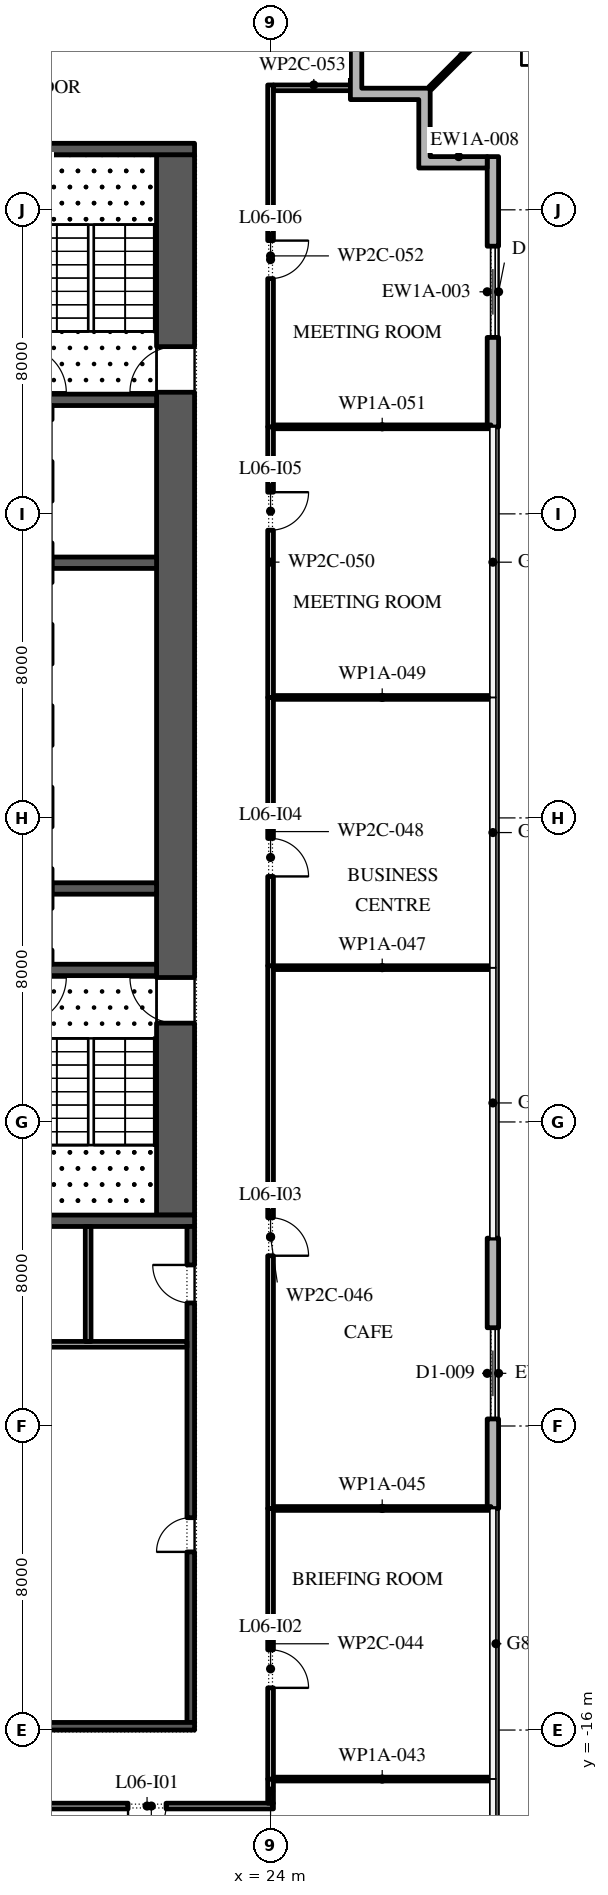
"""IFC4 building model, lengths in metres.
Left out: names, types, materials, properties, quantities, classifications, styles, units other than length and angle.
Written with IfcOpenShell. Run it as: python <this file> out.ifc"""

import sys

from ifc_helpers import new_model, si_unit, direction, frame, frame_2d, origin, place, context, subcontext, project, spatial, polyline, rectangle, outline, extrude, element, fill, save


model = new_model("IFC4")
c1 = context("Model", 3, precision=1e-05, world=origin(), true_north=direction((0.0, 1.0)))
c2 = subcontext(c1, "Body", "Model", "MODEL_VIEW")
j1 = project(units=[si_unit("LENGTHUNIT", "METRE"), si_unit("PLANEANGLEUNIT", "RADIAN")], contexts=[c1])
p1 = place(None, origin())
s1 = spatial("IfcSite", under=j1, at=p1, CompositionType="ELEMENT")
p2 = place(p1, origin())
s2 = spatial("IfcBuilding", under=s1, at=p2, CompositionType="ELEMENT")
p3 = place(p2, frame((0.0, 0.0, 33.6)))
s3 = spatial("IfcBuildingStorey", under=s2, at=p3, CompositionType="ELEMENT", Elevation=33.6)
p4 = place(p3, frame((29.85, -10.171, 0.0), z_axis=(0.0, 0.0, 1.0), x_axis=(0.0, 1.0, 0.0)))
e1 = element("IfcWall", 1, at=p4, inside=s3, PredefinedType="STANDARD", context=c2, shape_type="SweptSolid", body=[
    extrude(rectangle(XDim=7.114, YDim=0.3, at=frame_2d((3.557, 0.0))), origin(), (0.0, 0.0, 1.0), 5.8),
])
p5 = place(p4, frame((2.357, 0.0, 0.0)))
e2 = element("IfcOpeningElement", 2, at=p5, cuts=e1, PredefinedType="OPENING", context=c2, shape_type="SweptSolid", body=[
    extrude(rectangle(XDim=2.4, YDim=3.5, at=frame_2d((1.2, 1.75))), frame((0.0, 0.16, 0.0), z_axis=(0.0, -1.0, 0.0), x_axis=(1.0, 0.0, 0.0)), (0.0, 0.0, 1.0), 0.32),
])
p6 = place(p3, frame((29.85, 18.286, 0.0), z_axis=(0.0, 0.0, 1.0), x_axis=(0.0, 1.0, 0.0)))
e3 = element("IfcWall", 3, at=p6, inside=s3, PredefinedType="STANDARD", context=c2, shape_type="SweptSolid", body=[
    extrude(rectangle(XDim=7.114, YDim=0.3, at=frame_2d((3.557, 0.0))), origin(), (0.0, 0.0, 1.0), 5.8),
])
p7 = place(p6, frame((2.357, 0.0, 0.0)))
e4 = element("IfcOpeningElement", 4, at=p7, cuts=e3, PredefinedType="OPENING", context=c2, shape_type="SweptSolid", body=[
    extrude(rectangle(XDim=2.4, YDim=3.5, at=frame_2d((1.2, 1.75))), frame((0.0, 0.16, 0.0), z_axis=(0.0, -1.0, 0.0), x_axis=(1.0, 0.0, 0.0)), (0.0, 0.0, 1.0), 0.32),
])
p8 = place(p3, origin())
e5 = element("IfcWall", 5, at=p8, inside=s3, PredefinedType="STANDARD", context=c2, shape_type="SweptSolid", body=[
    extrude(outline(polyline([(27.9, 26.9), (26.1, 26.9), (26.1, 29.0), (26.4, 29.0), (26.4, 27.2), (28.2, 27.2), (28.2, 25.4), (29.7, 25.4), (29.7, 25.1), (27.9, 25.1), (27.9, 26.9)])), origin(), (0.0, 0.0, 1.0), 5.8),
])
p9 = place(p3, frame((28.2, 27.2, 0.0), z_axis=(0.0, 0.0, 1.0), x_axis=(0.707106781187, 0.707106781187, 0.0)))
e6 = element("IfcWall", 6, at=p9, inside=s3, PredefinedType="STANDARD", context=c2, shape_type="SweptSolid", body=[
    extrude(rectangle(XDim=2.385, YDim=0.1, at=frame_2d((1.192, 0.0))), origin(), (0.0, 0.0, 1.0), 5.8),
])
p10 = place(p3, frame((21.5, -2.45, 0.0), z_axis=(0.0, 0.0, 1.0), x_axis=(0.0, 1.0, 0.0)))
e7 = element("IfcWall", 7, at=p10, inside=s3, PredefinedType="SHEAR", context=c2, shape_type="SweptSolid", body=[
    extrude(rectangle(XDim=27.9, YDim=1.0, at=frame_2d((13.95, 0.0))), origin(), (0.0, 0.0, 1.0), 5.8),
])
p11 = place(p10, frame((5.05, 0.0, 0.0)))
e8 = element("IfcOpeningElement", 8, at=p11, cuts=e7, PredefinedType="OPENING", context=c2, shape_type="SweptSolid", body=[
    extrude(rectangle(XDim=1.2, YDim=2.1, at=frame_2d((0.6, 1.05))), frame((0.0, 0.51, 0.0), z_axis=(0.0, -1.0, 0.0), x_axis=(1.0, 0.0, 0.0)), (0.0, 0.0, 1.0), 1.02),
])
p12 = place(p10, frame((21.65, 0.0, 0.0)))
e9 = element("IfcOpeningElement", 9, at=p12, cuts=e7, PredefinedType="OPENING", context=c2, shape_type="SweptSolid", body=[
    extrude(rectangle(XDim=1.2, YDim=2.1, at=frame_2d((0.6, 1.05))), frame((0.0, 0.51, 0.0), z_axis=(0.0, -1.0, 0.0), x_axis=(1.0, 0.0, 0.0)), (0.0, 0.0, 1.0), 1.02),
])
for number, where, z_axis, x_axis in (
    (10, (10.0, -2.6, 0.0), (0.0, 0.0, 1.0), (1.0, 0.0, 0.0)),
    (11, (10.0, 25.6, 0.0), (0.0, 0.0, 1.0), (1.0, 0.0, 0.0)),
):
    element("IfcWall", number, at=place(p3, frame(where, z_axis=z_axis, x_axis=x_axis)), inside=s3, PredefinedType="SHEAR", context=c2, shape_type="SweptSolid", body=[
        extrude(rectangle(XDim=12.0, YDim=0.3, at=frame_2d((6.0, 0.0))), origin(), (0.0, 0.0, 1.0), 5.8),
    ])
for number, where, z_axis, x_axis in (
    (12, (17.3, 4.0, 0.0), (0.0, 0.0, 1.0), (1.0, 0.0, 0.0)),
    (13, (17.3, 19.0, 0.0), (0.0, 0.0, 1.0), (1.0, 0.0, 0.0)),
):
    element("IfcWall", number, at=place(p3, frame(where, z_axis=z_axis, x_axis=x_axis)), inside=s3, PredefinedType="SHEAR", context=c2, shape_type="SweptSolid", body=[
        extrude(rectangle(XDim=3.7, YDim=0.3, at=frame_2d((1.85, 0.0))), origin(), (0.0, 0.0, 1.0), 5.8),
    ])
for number, where, z_axis, x_axis in (
    (14, (18.25, 6.143, 0.0), (0.0, 0.0, 1.0), (1.0, 0.0, 0.0)),
    (15, (18.25, 14.714, 0.0), (0.0, 0.0, 1.0), (1.0, 0.0, 0.0)),
):
    element("IfcWall", number, at=place(p3, frame(where, z_axis=z_axis, x_axis=x_axis)), inside=s3, PredefinedType="SHEAR", context=c2, shape_type="SweptSolid", body=[
        extrude(rectangle(XDim=2.75, YDim=0.3, at=frame_2d((1.375, 0.0))), origin(), (0.0, 0.0, 1.0), 5.8),
    ])
p13 = place(p3, frame((21.9, -15.8, 0.0), z_axis=(0.0, 0.0, 1.0), x_axis=(0.0, 1.0, 0.0)))
e16 = element("IfcWall", 16, at=p13, inside=s3, PredefinedType="SHEAR", context=c2, shape_type="SweptSolid", body=[
    extrude(rectangle(XDim=13.05, YDim=0.2, at=frame_2d((6.525, 0.0))), origin(), (0.0, 0.0, 1.0), 5.8),
])
p14 = place(p13, frame((4.488, 0.0, 0.0)))
e17 = element("IfcOpeningElement", 17, at=p14, cuts=e16, PredefinedType="OPENING", context=c2, shape_type="SweptSolid", body=[
    extrude(rectangle(XDim=0.9, YDim=2.1, at=frame_2d((0.45, 1.05))), frame((0.0, 0.11, 0.0), z_axis=(0.0, -1.0, 0.0), x_axis=(1.0, 0.0, 0.0)), (0.0, 0.0, 1.0), 0.22),
])
p15 = place(p13, frame((11.038, 0.0, 0.0)))
e18 = element("IfcOpeningElement", 18, at=p15, cuts=e16, PredefinedType="OPENING", context=c2, shape_type="SweptSolid", body=[
    extrude(rectangle(XDim=1.0, YDim=2.1, at=frame_2d((0.5, 1.05))), frame((0.0, 0.11, 0.0), z_axis=(0.0, -1.0, 0.0), x_axis=(1.0, 0.0, 0.0)), (0.0, 0.0, 1.0), 0.22),
])
p16 = place(p3, frame((10.0, -15.9, 0.0), z_axis=(0.0, 0.0, 1.0), x_axis=(1.0, 0.0, 0.0)))
e19 = element("IfcWall", 19, at=p16, inside=s3, PredefinedType="SHEAR", context=c2, shape_type="SweptSolid", body=[
    extrude(rectangle(XDim=12.0, YDim=0.2, at=frame_2d((6.0, 0.0))), origin(), (0.0, 0.0, 1.0), 5.8),
])
p17 = place(p3, frame((16.075, -5.85, 0.0), z_axis=(0.0, 0.0, 1.0), x_axis=(1.0, 0.0, 0.0)))
e20 = element("IfcWall", 20, at=p17, inside=s3, PredefinedType="PARTITIONING", context=c2, shape_type="SweptSolid", body=[
    extrude(rectangle(XDim=5.725, YDim=0.15, at=frame_2d((2.863, 0.0))), origin(), (0.0, 0.0, 1.0), 5.8),
])
p18 = place(p3, frame((19.2, -5.775, 0.0), z_axis=(0.0, 0.0, 1.0), x_axis=(0.0, 1.0, 0.0)))
e21 = element("IfcWall", 21, at=p18, inside=s3, PredefinedType="PARTITIONING", context=c2, shape_type="SweptSolid", body=[
    extrude(rectangle(XDim=3.025, YDim=0.15, at=frame_2d((1.512, 0.0))), origin(), (0.0, 0.0, 1.0), 5.8),
])
p19 = place(p3, frame((24.075, -18.0, 0.0), z_axis=(0.0, 0.0, 1.0), x_axis=(-1.0, 0.0, 0.0)))
e22 = element("IfcWall", 22, at=p19, inside=s3, PredefinedType="PARTITIONING", context=c2, shape_type="SweptSolid", body=[
    extrude(rectangle(XDim=6.425, YDim=0.15, at=frame_2d((3.212, 0.0))), origin(), (0.0, 0.0, 1.0), 5.8),
])
p20 = place(p19, frame((2.825, 0.0, 0.0)))
e23 = element("IfcOpeningElement", 23, at=p20, cuts=e22, PredefinedType="OPENING", context=c2, shape_type="SweptSolid", body=[
    extrude(rectangle(XDim=1.0, YDim=2.1, at=frame_2d((0.5, 1.05))), frame((0.0, 0.085, 0.0), z_axis=(0.0, -1.0, 0.0), x_axis=(1.0, 0.0, 0.0)), (0.0, 0.0, 1.0), 0.17),
])
p21 = place(p3, frame((24.0, -17.29, 0.0), z_axis=(0.0, 0.0, 1.0), x_axis=(0.0, -1.0, 0.0)))
e24 = element("IfcWall", 24, at=p21, inside=s3, PredefinedType="PARTITIONING", context=c2, shape_type="SweptSolid", body=[
    extrude(rectangle(XDim=0.635, YDim=0.15, at=frame_2d((0.317, 0.0))), origin(), (0.0, 0.0, 1.0), 5.8),
])
p22 = place(p3, frame((24.075, -17.29, 0.0), z_axis=(0.0, 0.0, 1.0), x_axis=(1.0, 0.0, 0.0)))
e25 = element("IfcWall", 25, at=p22, inside=s3, PredefinedType="PARTITIONING", context=c2, shape_type="SweptSolid", body=[
    extrude(rectangle(XDim=5.725, YDim=0.1, at=frame_2d((2.863, 0.0))), origin(), (0.0, 0.0, 1.0), 5.8),
])
p23 = place(p3, frame((24.0, -10.17, 0.0), z_axis=(0.0, 0.0, 1.0), x_axis=(0.0, -1.0, 0.0)))
e26 = element("IfcWall", 26, at=p23, inside=s3, PredefinedType="PARTITIONING", context=c2, shape_type="SweptSolid", body=[
    extrude(rectangle(XDim=7.12, YDim=0.15, at=frame_2d((3.56, 0.0))), origin(), (0.0, 0.0, 1.0), 5.8),
])
p24 = place(p23, frame((3.72, 0.0, 0.0)))
e27 = element("IfcOpeningElement", 27, at=p24, cuts=e26, PredefinedType="OPENING", context=c2, shape_type="SweptSolid", body=[
    extrude(rectangle(XDim=1.0, YDim=2.1, at=frame_2d((0.5, 1.05))), frame((0.0, 0.085, 0.0), z_axis=(0.0, -1.0, 0.0), x_axis=(1.0, 0.0, 0.0)), (0.0, 0.0, 1.0), 0.17),
])
p25 = place(p3, frame((24.075, -10.17, 0.0), z_axis=(0.0, 0.0, 1.0), x_axis=(1.0, 0.0, 0.0)))
e28 = element("IfcWall", 28, at=p25, inside=s3, PredefinedType="PARTITIONING", context=c2, shape_type="SweptSolid", body=[
    extrude(rectangle(XDim=5.725, YDim=0.1, at=frame_2d((2.863, 0.0))), origin(), (0.0, 0.0, 1.0), 5.8),
])
p26 = place(p3, frame((24.0, 4.11, 0.0), z_axis=(0.0, 0.0, 1.0), x_axis=(0.0, -1.0, 0.0)))
e29 = element("IfcWall", 29, at=p26, inside=s3, PredefinedType="PARTITIONING", context=c2, shape_type="SweptSolid", body=[
    extrude(rectangle(XDim=14.28, YDim=0.15, at=frame_2d((7.14, 0.0))), origin(), (0.0, 0.0, 1.0), 5.8),
])
p27 = place(p26, frame((6.63, 0.0, 0.0)))
e30 = element("IfcOpeningElement", 30, at=p27, cuts=e29, PredefinedType="OPENING", context=c2, shape_type="SweptSolid", body=[
    extrude(rectangle(XDim=1.0, YDim=2.1, at=frame_2d((0.5, 1.05))), frame((0.0, 0.085, 0.0), z_axis=(0.0, -1.0, 0.0), x_axis=(1.0, 0.0, 0.0)), (0.0, 0.0, 1.0), 0.17),
])
p28 = place(p3, frame((24.075, 4.06, 0.0), z_axis=(0.0, 0.0, 1.0), x_axis=(1.0, 0.0, 0.0)))
e31 = element("IfcWall", 31, at=p28, inside=s3, PredefinedType="PARTITIONING", context=c2, shape_type="SweptSolid", body=[
    extrude(rectangle(XDim=5.725, YDim=0.1, at=frame_2d((2.863, 0.0))), origin(), (0.0, 0.0, 1.0), 5.8),
])
p29 = place(p3, frame((24.0, 11.17, 0.0), z_axis=(0.0, 0.0, 1.0), x_axis=(0.0, -1.0, 0.0)))
e32 = element("IfcWall", 32, at=p29, inside=s3, PredefinedType="PARTITIONING", context=c2, shape_type="SweptSolid", body=[
    extrude(rectangle(XDim=7.06, YDim=0.15, at=frame_2d((3.53, 0.0))), origin(), (0.0, 0.0, 1.0), 5.8),
])
p30 = place(p29, frame((3.71, 0.0, 0.0)))
e33 = element("IfcOpeningElement", 33, at=p30, cuts=e32, PredefinedType="OPENING", context=c2, shape_type="SweptSolid", body=[
    extrude(rectangle(XDim=1.0, YDim=2.1, at=frame_2d((0.5, 1.05))), frame((0.0, 0.085, 0.0), z_axis=(0.0, -1.0, 0.0), x_axis=(1.0, 0.0, 0.0)), (0.0, 0.0, 1.0), 0.17),
])
p31 = place(p3, frame((24.075, 11.17, 0.0), z_axis=(0.0, 0.0, 1.0), x_axis=(1.0, 0.0, 0.0)))
e34 = element("IfcWall", 34, at=p31, inside=s3, PredefinedType="PARTITIONING", context=c2, shape_type="SweptSolid", body=[
    extrude(rectangle(XDim=5.725, YDim=0.1, at=frame_2d((2.863, 0.0))), origin(), (0.0, 0.0, 1.0), 5.8),
])
p32 = place(p3, frame((24.0, 18.29, 0.0), z_axis=(0.0, 0.0, 1.0), x_axis=(0.0, -1.0, 0.0)))
e35 = element("IfcWall", 35, at=p32, inside=s3, PredefinedType="PARTITIONING", context=c2, shape_type="SweptSolid", body=[
    extrude(rectangle(XDim=7.12, YDim=0.15, at=frame_2d((3.56, 0.0))), origin(), (0.0, 0.0, 1.0), 5.8),
])
p33 = place(p32, frame((1.72, 0.0, 0.0)))
e36 = element("IfcOpeningElement", 36, at=p33, cuts=e35, PredefinedType="OPENING", context=c2, shape_type="SweptSolid", body=[
    extrude(rectangle(XDim=1.0, YDim=2.1, at=frame_2d((0.5, 1.05))), frame((0.0, 0.085, 0.0), z_axis=(0.0, -1.0, 0.0), x_axis=(1.0, 0.0, 0.0)), (0.0, 0.0, 1.0), 0.17),
])
p34 = place(p3, frame((24.075, 18.29, 0.0), z_axis=(0.0, 0.0, 1.0), x_axis=(1.0, 0.0, 0.0)))
e37 = element("IfcWall", 37, at=p34, inside=s3, PredefinedType="PARTITIONING", context=c2, shape_type="SweptSolid", body=[
    extrude(rectangle(XDim=5.725, YDim=0.1, at=frame_2d((2.863, 0.0))), origin(), (0.0, 0.0, 1.0), 5.8),
])
p35 = place(p3, frame((24.0, 27.285, 0.0), z_axis=(0.0, 0.0, 1.0), x_axis=(0.0, -1.0, 0.0)))
e38 = element("IfcWall", 38, at=p35, inside=s3, PredefinedType="PARTITIONING", context=c2, shape_type="SweptSolid", body=[
    extrude(rectangle(XDim=8.995, YDim=0.15, at=frame_2d((4.498, 0.0))), origin(), (0.0, 0.0, 1.0), 5.8),
])
p36 = place(p35, frame((4.095, 0.0, 0.0)))
e39 = element("IfcOpeningElement", 39, at=p36, cuts=e38, PredefinedType="OPENING", context=c2, shape_type="SweptSolid", body=[
    extrude(rectangle(XDim=1.0, YDim=2.1, at=frame_2d((0.5, 1.05))), frame((0.0, 0.085, 0.0), z_axis=(0.0, -1.0, 0.0), x_axis=(1.0, 0.0, 0.0)), (0.0, 0.0, 1.0), 0.17),
])
p37 = place(p3, frame((26.2, 27.21, 0.0), z_axis=(0.0, 0.0, 1.0), x_axis=(-1.0, 0.0, 0.0)))
e40 = element("IfcWall", 40, at=p37, inside=s3, PredefinedType="PARTITIONING", context=c2, shape_type="SweptSolid", body=[
    extrude(rectangle(XDim=2.125, YDim=0.15, at=frame_2d((1.062, 0.0))), origin(), (0.0, 0.0, 1.0), 5.8),
])
p38 = place(p5, origin())
e41 = element("IfcDoor", 41, at=p38, inside=s3, OperationType="DOUBLE_DOOR_SLIDING", PredefinedType="DOOR", context=c2, shape_type="SweptSolid", body=[
    extrude(rectangle(XDim=2.4, YDim=3.5, at=frame_2d((1.2, 1.75))), frame((0.0, 0.025, 0.0), z_axis=(0.0, -1.0, 0.0), x_axis=(1.0, 0.0, 0.0)), (0.0, 0.0, 1.0), 0.05),
])
fill(e2, e41)
p39 = place(p7, origin())
e42 = element("IfcDoor", 42, at=p39, inside=s3, OperationType="DOUBLE_DOOR_SLIDING", PredefinedType="DOOR", context=c2, shape_type="SweptSolid", body=[
    extrude(rectangle(XDim=2.4, YDim=3.5, at=frame_2d((1.2, 1.75))), frame((0.0, 0.025, 0.0), z_axis=(0.0, -1.0, 0.0), x_axis=(1.0, 0.0, 0.0)), (0.0, 0.0, 1.0), 0.05),
])
fill(e4, e42)
p40 = place(p11, origin())
e43 = element("IfcDoor", 43, at=p40, inside=s3, OperationType="SINGLE_SWING_LEFT", PredefinedType="DOOR", context=c2, shape_type="SweptSolid", body=[
    extrude(rectangle(XDim=1.2, YDim=2.1, at=frame_2d((0.6, 1.05))), frame((0.0, 0.025, 0.0), z_axis=(0.0, -1.0, 0.0), x_axis=(1.0, 0.0, 0.0)), (0.0, 0.0, 1.0), 0.05),
])
fill(e8, e43)
p41 = place(p12, origin())
e44 = element("IfcDoor", 44, at=p41, inside=s3, OperationType="SINGLE_SWING_RIGHT", PredefinedType="DOOR", context=c2, shape_type="SweptSolid", body=[
    extrude(rectangle(XDim=1.2, YDim=2.1, at=frame_2d((0.6, 1.05))), frame((0.0, 0.025, 0.0), z_axis=(0.0, -1.0, 0.0), x_axis=(1.0, 0.0, 0.0)), (0.0, 0.0, 1.0), 0.05),
])
fill(e9, e44)
p42 = place(p14, origin())
e45 = element("IfcDoor", 45, at=p42, inside=s3, OperationType="SINGLE_SWING_RIGHT", PredefinedType="DOOR", context=c2, shape_type="SweptSolid", body=[
    extrude(rectangle(XDim=0.9, YDim=2.1, at=frame_2d((0.45, 1.05))), frame((0.0, 0.1, 0.0), z_axis=(0.0, -1.0, 0.0), x_axis=(1.0, 0.0, 0.0)), (0.0, 0.0, 1.0), 0.05),
])
fill(e17, e45)
p43 = place(p15, origin())
e46 = element("IfcDoor", 46, at=p43, inside=s3, OperationType="SINGLE_SWING_LEFT", PredefinedType="DOOR", context=c2, shape_type="SweptSolid", body=[
    extrude(rectangle(XDim=1.0, YDim=2.1, at=frame_2d((0.5, 1.05))), frame((0.0, 0.1, 0.0), z_axis=(0.0, -1.0, 0.0), x_axis=(1.0, 0.0, 0.0)), (0.0, 0.0, 1.0), 0.05),
])
fill(e18, e46)
p44 = place(p20, origin())
e47 = element("IfcDoor", 47, at=p44, inside=s3, OperationType="SINGLE_SWING_LEFT", PredefinedType="DOOR", context=c2, shape_type="SweptSolid", body=[
    extrude(rectangle(XDim=1.0, YDim=2.1, at=frame_2d((0.5, 1.05))), frame((0.0, 0.025, 0.0), z_axis=(0.0, -1.0, 0.0), x_axis=(1.0, 0.0, 0.0)), (0.0, 0.0, 1.0), 0.05),
])
fill(e23, e47)
p45 = place(p24, origin())
e48 = element("IfcDoor", 48, at=p45, inside=s3, OperationType="SINGLE_SWING_LEFT", PredefinedType="DOOR", context=c2, shape_type="SweptSolid", body=[
    extrude(rectangle(XDim=1.0, YDim=2.1, at=frame_2d((0.5, 1.05))), frame((0.0, 0.025, 0.0), z_axis=(0.0, -1.0, 0.0), x_axis=(1.0, 0.0, 0.0)), (0.0, 0.0, 1.0), 0.05),
])
fill(e27, e48)
p46 = place(p27, origin())
e49 = element("IfcDoor", 49, at=p46, inside=s3, OperationType="SINGLE_SWING_LEFT", PredefinedType="DOOR", context=c2, shape_type="SweptSolid", body=[
    extrude(rectangle(XDim=1.0, YDim=2.1, at=frame_2d((0.5, 1.05))), frame((0.0, 0.025, 0.0), z_axis=(0.0, -1.0, 0.0), x_axis=(1.0, 0.0, 0.0)), (0.0, 0.0, 1.0), 0.05),
])
fill(e30, e49)
p47 = place(p30, origin())
e50 = element("IfcDoor", 50, at=p47, inside=s3, OperationType="SINGLE_SWING_LEFT", PredefinedType="DOOR", context=c2, shape_type="SweptSolid", body=[
    extrude(rectangle(XDim=1.0, YDim=2.1, at=frame_2d((0.5, 1.05))), frame((0.0, 0.025, 0.0), z_axis=(0.0, -1.0, 0.0), x_axis=(1.0, 0.0, 0.0)), (0.0, 0.0, 1.0), 0.05),
])
fill(e33, e50)
p48 = place(p33, origin())
e51 = element("IfcDoor", 51, at=p48, inside=s3, OperationType="SINGLE_SWING_RIGHT", PredefinedType="DOOR", context=c2, shape_type="SweptSolid", body=[
    extrude(rectangle(XDim=1.0, YDim=2.1, at=frame_2d((0.5, 1.05))), frame((0.0, 0.025, 0.0), z_axis=(0.0, -1.0, 0.0), x_axis=(1.0, 0.0, 0.0)), (0.0, 0.0, 1.0), 0.05),
])
fill(e36, e51)
p49 = place(p36, origin())
e52 = element("IfcDoor", 52, at=p49, inside=s3, OperationType="SINGLE_SWING_RIGHT", PredefinedType="DOOR", context=c2, shape_type="SweptSolid", body=[
    extrude(rectangle(XDim=1.0, YDim=2.1, at=frame_2d((0.5, 1.05))), frame((0.0, 0.025, 0.0), z_axis=(0.0, -1.0, 0.0), x_axis=(1.0, 0.0, 0.0)), (0.0, 0.0, 1.0), 0.05),
])
fill(e39, e52)
save(model, sys.argv[1])
